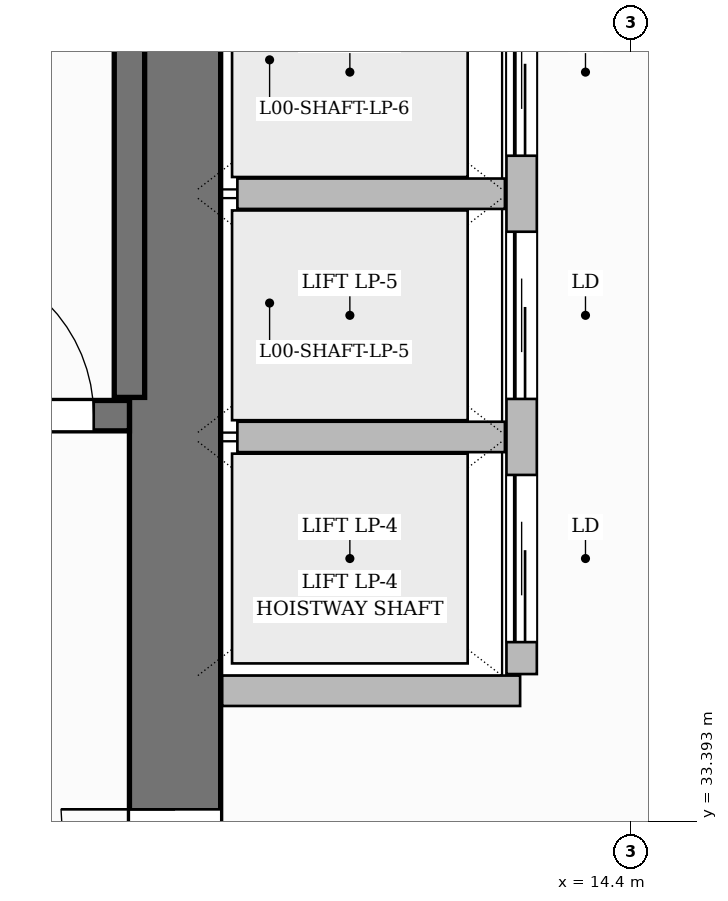
"""IFC4 building model, lengths in metres.
Left out: names, types, materials, properties, quantities, classifications, styles, units other than length and angle.
Written with IfcOpenShell. Run it as: python <this file> out.ifc"""

import sys

from ifc_helpers import new_model, si_unit, direction, frame, frame_2d, origin, place, context, subcontext, project, spatial, rectangle, extrude, source, transform, mapped, element, fill, save


model = new_model("IFC4")
c1 = context("Model", 3, precision=1e-05, world=origin(), true_north=direction((0.0, 1.0)))
c2 = subcontext(c1, "Body", "Model", "MODEL_VIEW")
j1 = project(units=[si_unit("LENGTHUNIT", "METRE"), si_unit("PLANEANGLEUNIT", "RADIAN")], contexts=[c1])
p1 = place(None, origin())
s1 = spatial("IfcSite", under=j1, at=p1, CompositionType="ELEMENT")
p2 = place(p1, origin())
s2 = spatial("IfcBuilding", under=s1, at=p2, CompositionType="ELEMENT")
p3 = place(p2, origin())
s3 = spatial("IfcBuildingStorey", under=s2, at=p3, CompositionType="ELEMENT", Elevation=0.0)
p4 = place(p3, frame((11.4, 25.5, 0.0), z_axis=(0.0, 0.0, 1.0), x_axis=(0.0, 1.0, 0.0)))
e1 = element("IfcWall", 1, at=p4, inside=s3, PredefinedType="SHEAR", context=c2, shape_type="SweptSolid", body=[
    extrude(rectangle(XDim=13.8, YDim=0.6, at=frame_2d((6.9, 0.0))), origin(), (0.0, 0.0, 1.0), 5.4),
])
p5 = place(p4, frame((6.47, 0.0, 0.0)))
e2 = element("IfcOpeningElement", 2, at=p5, cuts=e1, PredefinedType="OPENING", context=c2, shape_type="SweptSolid", body=[
    extrude(rectangle(XDim=1.5, YDim=2.2, at=frame_2d((0.75, 1.1))), frame((0.0, 0.31, 0.0), z_axis=(0.0, -1.0, 0.0), x_axis=(1.0, 0.0, 0.0)), (0.0, 0.0, 1.0), 0.62),
])
p6 = place(p3, frame((11.1, 36.18, 0.0), z_axis=(0.0, 0.0, 1.0), x_axis=(0.0, 1.0, 0.0)))
e3 = element("IfcWall", 3, at=p6, inside=s3, PredefinedType="SHEAR", context=c2, shape_type="SweptSolid", body=[
    extrude(rectangle(XDim=2.7, YDim=0.2, at=frame_2d((1.35, 0.0))), origin(), (0.0, 0.0, 1.0), 5.4),
])
p7 = place(p3, frame((4.0, 36.06, 0.0), z_axis=(0.0, 0.0, 1.0), x_axis=(1.0, 0.0, 0.0)))
e4 = element("IfcWall", 4, at=p7, inside=s3, PredefinedType="SHEAR", context=c2, shape_type="SweptSolid", body=[
    extrude(rectangle(XDim=7.1, YDim=0.2, at=frame_2d((3.55, 0.0))), origin(), (0.0, 0.0, 1.0), 5.4),
])
p8 = place(p7, frame((5.815, 0.0, 0.0)))
e5 = element("IfcOpeningElement", 5, at=p8, cuts=e4, PredefinedType="OPENING", context=c2, shape_type="SweptSolid", body=[
    extrude(rectangle(XDim=1.05, YDim=2.2, at=frame_2d((0.525, 1.1))), frame((0.0, 0.11, 0.0), z_axis=(0.0, -1.0, 0.0), x_axis=(1.0, 0.0, 0.0)), (0.0, 0.0, 1.0), 0.22),
])
p9 = place(p3, frame((11.71, 34.25, 0.0), z_axis=(0.0, 0.0, 1.0), x_axis=(1.0, 0.0, 0.0)))
e6 = element("IfcWall", 6, at=p9, inside=s3, PredefinedType="PARTITIONING", context=c2, shape_type="SweptSolid", body=[
    extrude(rectangle(XDim=1.96, YDim=0.2, at=frame_2d((0.98, 0.0))), origin(), (0.0, 0.0, 1.0), 5.1),
])
p10 = place(p3, frame((13.68, 34.36, 0.0), z_axis=(0.0, 0.0, 1.0), x_axis=(0.0, 1.0, 0.0)))
e7 = element("IfcWall", 7, at=p10, inside=s3, PredefinedType="PARTITIONING", context=c2, shape_type="SweptSolid", body=[
    extrude(rectangle(XDim=4.72, YDim=0.2, at=frame_2d((2.36, 0.0))), origin(), (0.0, 0.0, 1.0), 5.1),
])
p11 = place(p10, frame((0.21, 0.0, 0.0)))
e8 = element("IfcOpeningElement", 8, at=p11, cuts=e7, PredefinedType="OPENING", context=c2, shape_type="SweptSolid", body=[
    extrude(rectangle(XDim=1.1, YDim=2.2, at=frame_2d((0.55, 1.1))), frame((0.0, 0.11, 0.0), z_axis=(0.0, -1.0, 0.0), x_axis=(1.0, 0.0, 0.0)), (0.0, 0.0, 1.0), 0.22),
])
p12 = place(p10, frame((1.81, 0.0, 0.0)))
e9 = element("IfcOpeningElement", 9, at=p12, cuts=e7, PredefinedType="OPENING", context=c2, shape_type="SweptSolid", body=[
    extrude(rectangle(XDim=1.1, YDim=2.2, at=frame_2d((0.55, 1.1))), frame((0.0, 0.11, 0.0), z_axis=(0.0, -1.0, 0.0), x_axis=(1.0, 0.0, 0.0)), (0.0, 0.0, 1.0), 0.22),
])
p13 = place(p10, frame((3.41, 0.0, 0.0)))
e10 = element("IfcOpeningElement", 10, at=p13, cuts=e7, PredefinedType="OPENING", context=c2, shape_type="SweptSolid", body=[
    extrude(rectangle(XDim=1.1, YDim=2.2, at=frame_2d((0.55, 1.1))), frame((0.0, 0.11, 0.0), z_axis=(0.0, -1.0, 0.0), x_axis=(1.0, 0.0, 0.0)), (0.0, 0.0, 1.0), 0.22),
])
for number, where, z_axis, x_axis in (
    (11, (11.81, 35.92, 0.0), (0.0, 0.0, 1.0), (1.0, 0.0, 0.0)),
    (12, (11.81, 37.52, 0.0), (0.0, 0.0, 1.0), (1.0, 0.0, 0.0)),
):
    element("IfcWall", number, at=place(p3, frame(where, z_axis=z_axis, x_axis=x_axis)), inside=s3, PredefinedType="PARTITIONING", context=c2, shape_type="SweptSolid", body=[
        extrude(rectangle(XDim=1.76, YDim=0.2, at=frame_2d((0.88, 0.0))), origin(), (0.0, 0.0, 1.0), 5.1),
    ])
m1 = source(origin(), c2, "Body", "SweptSolid", [
    extrude(rectangle(XDim=1.05, YDim=2.2, at=frame_2d((0.525, 1.1))), frame((0.0, 0.025, 0.0), z_axis=(0.0, -1.0, 0.0), x_axis=(1.0, 0.0, 0.0)), (0.0, 0.0, 1.0), 0.05),
])
p14 = place(p8, origin())
e13 = element("IfcDoor", 13, at=p14, inside=s3, OperationType="SINGLE_SWING_LEFT", PredefinedType="DOOR", context=c2, shape_type="MappedRepresentation", body=[
    mapped(m1, transform((0.0, 0.0, 0.0), scale=1.0)),
])
fill(e5, e13)
m2 = source(origin(), c2, "Body", "SweptSolid", [
    extrude(rectangle(XDim=1.5, YDim=2.2, at=frame_2d((0.75, 1.1))), frame((0.0, 0.025, 0.0), z_axis=(0.0, -1.0, 0.0), x_axis=(1.0, 0.0, 0.0)), (0.0, 0.0, 1.0), 0.05),
])
p15 = place(p5, origin())
e14 = element("IfcDoor", 14, at=p15, inside=s3, OperationType="DOUBLE_DOOR_SINGLE_SWING", PredefinedType="DOOR", context=c2, shape_type="MappedRepresentation", body=[
    mapped(m2, transform((0.0, 0.0, 0.0), scale=1.0)),
])
fill(e2, e14)
m3 = source(origin(), c2, "Body", "SweptSolid", [
    extrude(rectangle(XDim=1.1, YDim=2.2, at=frame_2d((0.55, 1.1))), frame((0.0, 0.025, 0.0), z_axis=(0.0, -1.0, 0.0), x_axis=(1.0, 0.0, 0.0)), (0.0, 0.0, 1.0), 0.05),
])
p16 = place(p11, origin())
e15 = element("IfcDoor", 15, at=p16, inside=s3, OperationType="SLIDING_TO_LEFT", PredefinedType="DOOR", context=c2, shape_type="MappedRepresentation", body=[
    mapped(m3, transform((0.0, 0.0, 0.0), scale=1.0)),
])
fill(e8, e15)
p17 = place(p12, origin())
e16 = element("IfcDoor", 16, at=p17, inside=s3, OperationType="SLIDING_TO_LEFT", PredefinedType="DOOR", context=c2, shape_type="MappedRepresentation", body=[
    mapped(m3, transform((0.0, 0.0, 0.0), scale=1.0)),
])
fill(e9, e16)
p18 = place(p13, origin())
e17 = element("IfcDoor", 17, at=p18, inside=s3, OperationType="SLIDING_TO_LEFT", PredefinedType="DOOR", context=c2, shape_type="MappedRepresentation", body=[
    mapped(m3, transform((0.0, 0.0, 0.0), scale=1.0)),
])
fill(e10, e17)
save(model, sys.argv[1])
